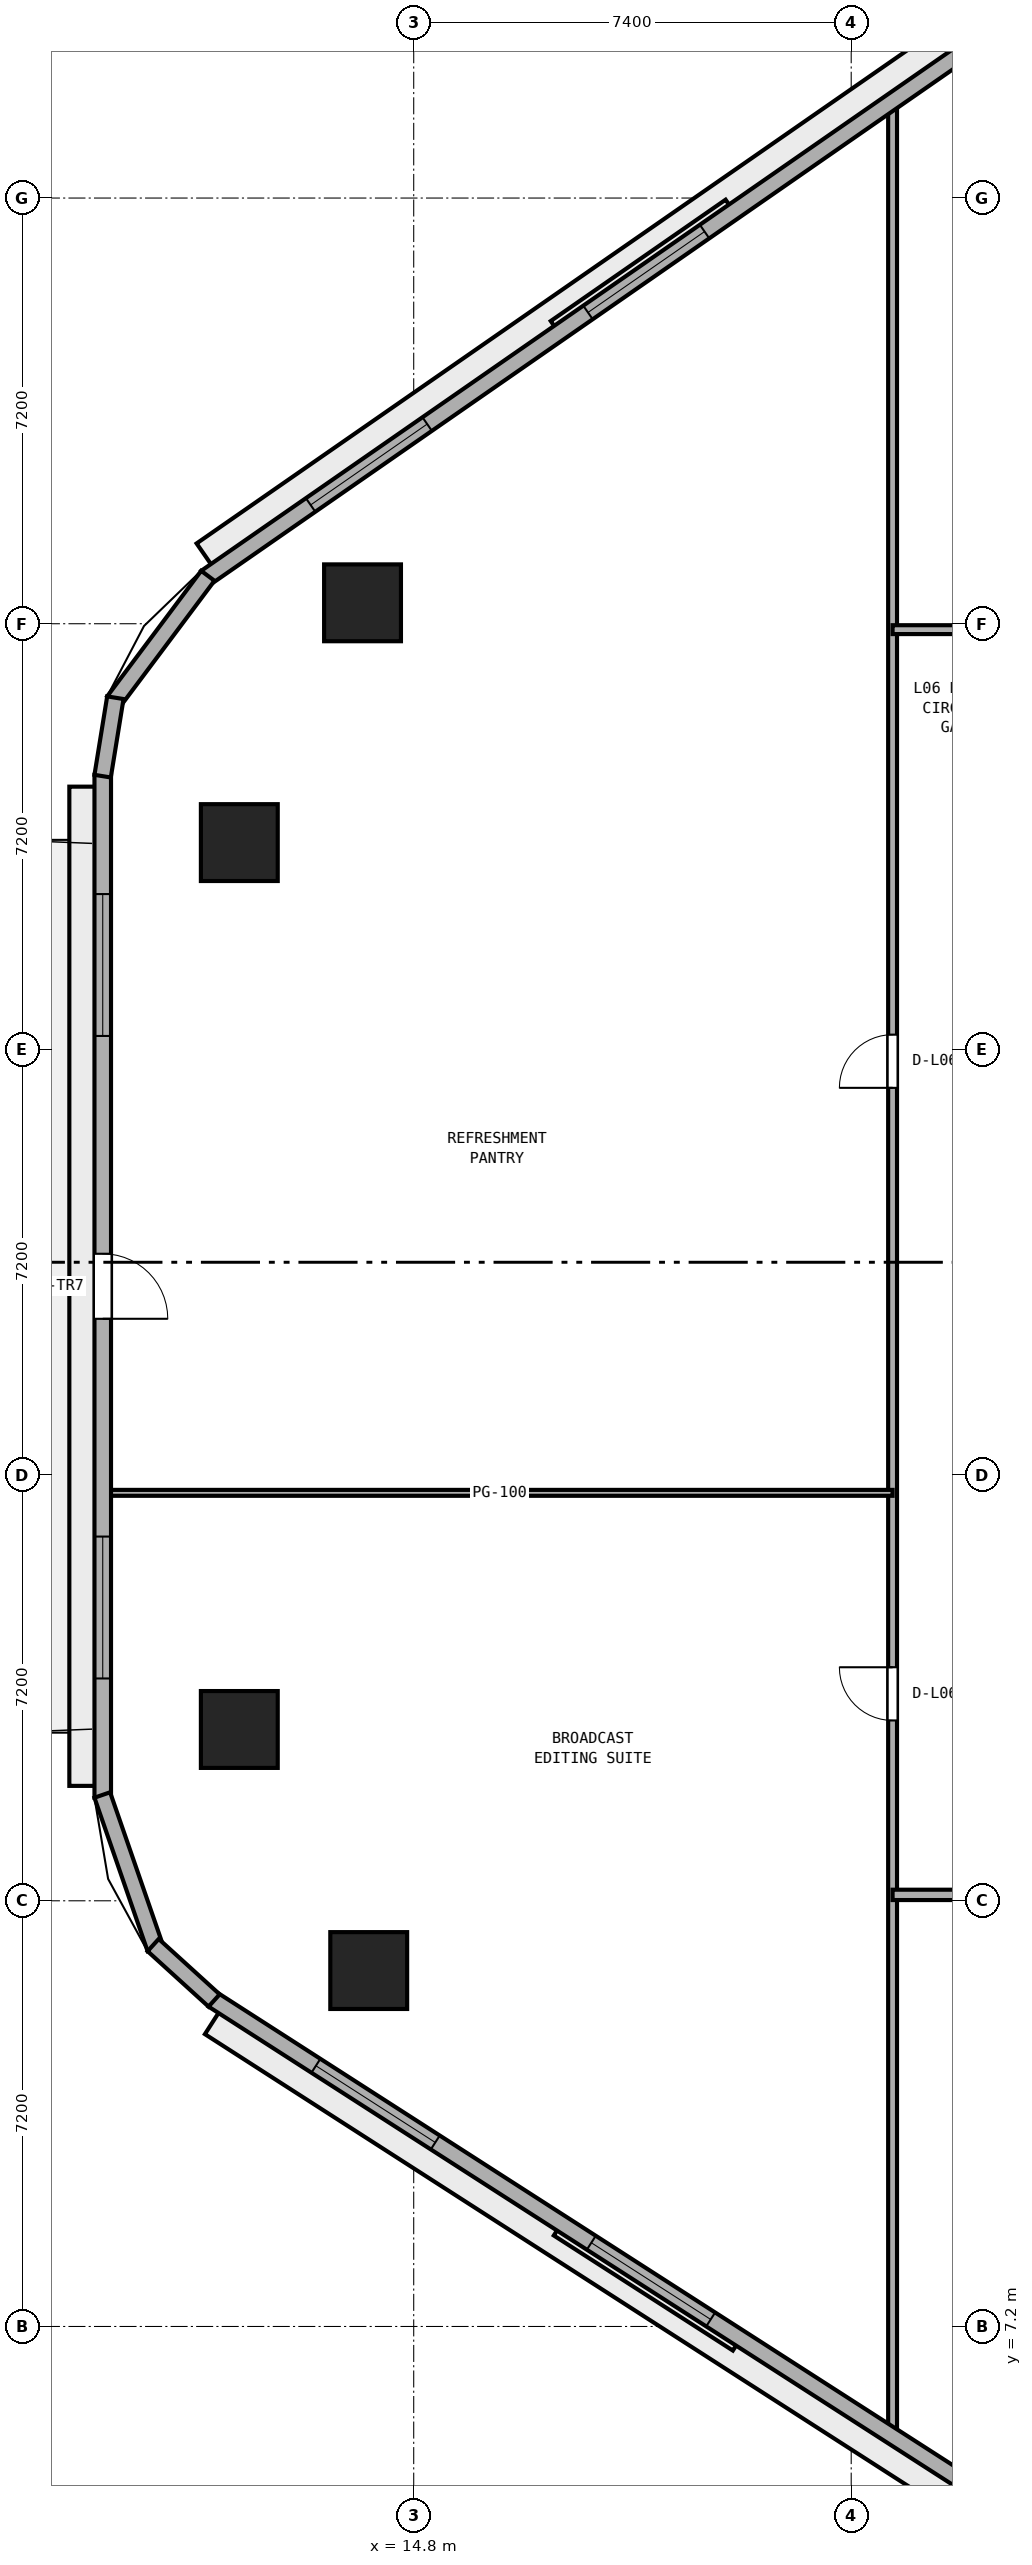
"""IFC4 building model, lengths in metres.
Left out: names, types, materials, properties, quantities, classifications, styles, units other than length and angle.
Written with IfcOpenShell. Run it as: python <this file> out.ifc"""

import sys

from ifc_helpers import new_model, si_unit, direction, frame, frame_2d, origin, origin_2d, place, context, subcontext, project, spatial, rectangle, extrude, element, fill, save


model = new_model("IFC4")
c1 = context("Model", 3, precision=1e-05, world=origin(), true_north=direction((0.0, 1.0)))
c2 = subcontext(c1, "Body", "Model", "MODEL_VIEW")
j1 = project(units=[si_unit("LENGTHUNIT", "METRE"), si_unit("PLANEANGLEUNIT", "RADIAN")], contexts=[c1])
p1 = place(None, origin())
s1 = spatial("IfcSite", under=j1, at=p1, CompositionType="ELEMENT")
p2 = place(p1, origin())
s2 = spatial("IfcBuilding", under=s1, at=p2, CompositionType="ELEMENT")
p3 = place(p2, frame((0.0, 0.0, 28.8)))
s3 = spatial("IfcBuildingStorey", under=s2, at=p3, CompositionType="ELEMENT", Elevation=28.8)
for number, where, z_axis, x_axis in (
    (1, (13.934, 36.354, 0.0), (0.0, 0.0, 1.0), (1.0, 0.0, 0.0)),
    (2, (11.85, 32.298, 0.0), (0.0, 0.0, 1.0), (1.0, 0.0, 0.0)),
    (3, (11.85, 17.298, 0.0), (0.0, 0.0, 1.0), (1.0, 0.0, 0.0)),
    (4, (14.039, 13.22, 0.0), (0.0, 0.0, 1.0), (1.0, 0.0, 0.0)),
):
    element("IfcColumn", number, at=place(p3, frame(where, z_axis=z_axis, x_axis=x_axis)), inside=s3, PredefinedType="COLUMN", context=c2, shape_type="SweptSolid", body=[
        extrude(rectangle(XDim=1.3, YDim=1.3, at=origin_2d()), origin(), (0.0, 0.0, 1.0), 3.8),
    ])
p4 = place(p3, frame((22.9, 5.316, 0.0), z_axis=(0.0, 0.0, 1.0), x_axis=(0.0, 1.0, 0.0)))
e5 = element("IfcWall", 5, at=p4, inside=s3, PredefinedType="PARTITIONING", context=c2, shape_type="SweptSolid", body=[
    extrude(rectangle(XDim=39.555, YDim=0.15, at=frame_2d((19.777, 0.0))), origin(), (0.0, 0.0, 1.0), 3.525),
])
p5 = place(p4, frame((12.135, 0.0, 0.0)))
e6 = element("IfcOpeningElement", 6, at=p5, cuts=e5, PredefinedType="OPENING", context=c2, shape_type="SweptSolid", body=[
    extrude(rectangle(XDim=0.9, YDim=2.1, at=frame_2d((0.45, 1.05))), frame((0.0, 0.085, 0.0), z_axis=(0.0, -1.0, 0.0), x_axis=(1.0, 0.0, 0.0)), (0.0, 0.0, 1.0), 0.17),
])
p6 = place(p4, frame((22.834, 0.0, 0.0)))
e7 = element("IfcOpeningElement", 7, at=p6, cuts=e5, PredefinedType="OPENING", context=c2, shape_type="SweptSolid", body=[
    extrude(rectangle(XDim=0.9, YDim=2.1, at=frame_2d((0.45, 1.05))), frame((0.0, 0.085, 0.0), z_axis=(0.0, -1.0, 0.0), x_axis=(1.0, 0.0, 0.0)), (0.0, 0.0, 1.0), 0.17),
])
p7 = place(p3, frame((22.9, 14.5, 0.0), z_axis=(0.0, 0.0, 1.0), x_axis=(1.0, 0.0, 0.0)))
e8 = element("IfcWall", 8, at=p7, inside=s3, PredefinedType="PARTITIONING", context=c2, shape_type="SweptSolid", body=[
    extrude(rectangle(XDim=28.2, YDim=0.175, at=frame_2d((14.1, 0.0))), origin(), (0.0, 0.0, 1.0), 3.525),
])
p8 = place(p7, frame((10.07, 0.0, 0.0)))
e9 = element("IfcOpeningElement", 9, at=p8, cuts=e8, PredefinedType="OPENING", context=c2, shape_type="SweptSolid", body=[
    extrude(rectangle(XDim=0.9, YDim=2.1, at=frame_2d((0.45, 1.05))), frame((0.0, 0.097, 0.0), z_axis=(0.0, -1.0, 0.0), x_axis=(1.0, 0.0, 0.0)), (0.0, 0.0, 1.0), 0.195),
])
p9 = place(p7, frame((23.93, 0.0, 0.0)))
e10 = element("IfcOpeningElement", 10, at=p9, cuts=e8, PredefinedType="OPENING", context=c2, shape_type="SweptSolid", body=[
    extrude(rectangle(XDim=0.9, YDim=2.1, at=frame_2d((0.45, 1.05))), frame((0.0, 0.097, 0.0), z_axis=(0.0, -1.0, 0.0), x_axis=(1.0, 0.0, 0.0)), (0.0, 0.0, 1.0), 0.195),
])
p10 = place(p3, frame((9.605, 21.3, 0.0), z_axis=(0.0, 0.0, 1.0), x_axis=(1.0, 0.0, 0.0)))
e11 = element("IfcWall", 11, at=p10, inside=s3, PredefinedType="PARTITIONING", context=c2, shape_type="SweptSolid", body=[
    extrude(rectangle(XDim=13.295, YDim=0.1, at=frame_2d((6.647, 0.0))), origin(), (0.0, 0.0, 1.0), 3.525),
])
p11 = place(p3, frame((22.9, 35.9, 0.0), z_axis=(0.0, 0.0, 1.0), x_axis=(1.0, 0.0, 0.0)))
e12 = element("IfcWall", 12, at=p11, inside=s3, PredefinedType="PARTITIONING", context=c2, shape_type="SweptSolid", body=[
    extrude(rectangle(XDim=28.2, YDim=0.15, at=frame_2d((14.1, 0.0))), origin(), (0.0, 0.0, 1.0), 3.525),
])
p12 = place(p11, frame((13.6, 0.0, 0.0)))
e13 = element("IfcOpeningElement", 13, at=p12, cuts=e12, PredefinedType="OPENING", context=c2, shape_type="SweptSolid", body=[
    extrude(rectangle(XDim=1.0, YDim=2.12, at=frame_2d((0.5, 1.06))), frame((0.0, 0.085, 0.0), z_axis=(0.0, -1.0, 0.0), x_axis=(1.0, 0.0, 0.0)), (0.0, 0.0, 1.0), 0.17),
])
p13 = place(p3, frame((26.182, 47.118, 0.0), z_axis=(0.0, 0.0, 1.0), x_axis=(-0.821547956627, -0.570139417127, 0.0)))
e14 = element("IfcWall", 14, at=p13, inside=s3, PredefinedType="STANDARD", context=c2, shape_type="SweptSolid", body=[
    extrude(rectangle(XDim=18.132, YDim=0.28, at=frame_2d((9.066, 0.0))), origin(), (0.0, 0.0, 1.0), 3.525),
])
p14 = place(p13, frame((7.866, 0.0, 0.9)))
e15 = element("IfcOpeningElement", 15, at=p14, cuts=e14, PredefinedType="OPENING", context=c2, shape_type="SweptSolid", body=[
    extrude(rectangle(XDim=2.4, YDim=1.75, at=frame_2d((1.2, 0.875))), frame((0.0, 0.15, 0.0), z_axis=(0.0, -1.0, 0.0), x_axis=(1.0, 0.0, 0.0)), (0.0, 0.0, 1.0), 0.3),
])
p15 = place(p13, frame((13.577, 0.0, 0.9)))
e16 = element("IfcOpeningElement", 16, at=p15, cuts=e14, PredefinedType="OPENING", context=c2, shape_type="SweptSolid", body=[
    extrude(rectangle(XDim=2.4, YDim=1.75, at=frame_2d((1.2, 0.875))), frame((0.0, 0.15, 0.0), z_axis=(0.0, -1.0, 0.0), x_axis=(1.0, 0.0, 0.0)), (0.0, 0.0, 1.0), 0.3),
])
p16 = place(p3, frame((9.54, 33.444, 0.0), z_axis=(0.0, 0.0, 1.0), x_axis=(0.0, -1.0, 0.0)))
e17 = element("IfcWall", 17, at=p16, inside=s3, PredefinedType="STANDARD", context=c2, shape_type="SweptSolid", body=[
    extrude(rectangle(XDim=17.301, YDim=0.28, at=frame_2d((8.65, 0.0))), origin(), (0.0, 0.0, 1.0), 3.525),
])
p17 = place(p16, frame((8.1, 0.0, 0.0)))
e18 = element("IfcOpeningElement", 18, at=p17, cuts=e17, PredefinedType="OPENING", context=c2, shape_type="SweptSolid", body=[
    extrude(rectangle(XDim=1.1, YDim=2.2, at=frame_2d((0.55, 1.1))), frame((0.0, 0.15, 0.0), z_axis=(0.0, -1.0, 0.0), x_axis=(1.0, 0.0, 0.0)), (0.0, 0.0, 1.0), 0.3),
])
p18 = place(p16, frame((2.017, 0.0, 0.9)))
e19 = element("IfcOpeningElement", 19, at=p18, cuts=e17, PredefinedType="OPENING", context=c2, shape_type="SweptSolid", body=[
    extrude(rectangle(XDim=2.4, YDim=1.75, at=frame_2d((1.2, 0.875))), frame((0.0, 0.15, 0.0), z_axis=(0.0, -1.0, 0.0), x_axis=(1.0, 0.0, 0.0)), (0.0, 0.0, 1.0), 0.3),
])
p19 = place(p16, frame((12.884, 0.0, 0.9)))
e20 = element("IfcOpeningElement", 20, at=p19, cuts=e17, PredefinedType="OPENING", context=c2, shape_type="SweptSolid", body=[
    extrude(rectangle(XDim=2.4, YDim=1.75, at=frame_2d((1.2, 0.875))), frame((0.0, 0.15, 0.0), z_axis=(0.0, -1.0, 0.0), x_axis=(1.0, 0.0, 0.0)), (0.0, 0.0, 1.0), 0.3),
])
p20 = place(p3, frame((11.405, 12.728, 0.0), z_axis=(0.0, 0.0, 1.0), x_axis=(0.841304564637, -0.540561402175, 0.0)))
e21 = element("IfcWall", 21, at=p20, inside=s3, PredefinedType="STANDARD", context=c2, shape_type="SweptSolid", body=[
    extrude(rectangle(XDim=17.612, YDim=0.28, at=frame_2d((8.806, 0.0))), origin(), (0.0, 0.0, 1.0), 3.525),
])
p21 = place(p20, frame((2.069, 0.0, 0.9)))
e22 = element("IfcOpeningElement", 22, at=p21, cuts=e21, PredefinedType="OPENING", context=c2, shape_type="SweptSolid", body=[
    extrude(rectangle(XDim=2.4, YDim=1.75, at=frame_2d((1.2, 0.875))), frame((0.0, 0.15, 0.0), z_axis=(0.0, -1.0, 0.0), x_axis=(1.0, 0.0, 0.0)), (0.0, 0.0, 1.0), 0.3),
])
p22 = place(p20, frame((7.606, 0.0, 0.9)))
e23 = element("IfcOpeningElement", 23, at=p22, cuts=e21, PredefinedType="OPENING", context=c2, shape_type="SweptSolid", body=[
    extrude(rectangle(XDim=2.4, YDim=1.75, at=frame_2d((1.2, 0.875))), frame((0.0, 0.15, 0.0), z_axis=(0.0, -1.0, 0.0), x_axis=(1.0, 0.0, 0.0)), (0.0, 0.0, 1.0), 0.3),
])
p23 = place(p3, frame((11.318, 36.811, 0.0), z_axis=(0.0, 0.0, 1.0), x_axis=(-0.599455152629, -0.800408345775, 0.0)))
e24 = element("IfcWall", 24, at=p23, inside=s3, PredefinedType="STANDARD", context=c2, shape_type="SweptSolid", body=[
    extrude(rectangle(XDim=2.653, YDim=0.28, at=frame_2d((1.327, 0.0))), origin(), (0.0, 0.0, 1.0), 3.525),
])
p24 = place(p3, frame((9.753, 34.749, 0.0), z_axis=(0.0, 0.0, 1.0), x_axis=(-0.160037671962, -0.987110907423, 0.0)))
e25 = element("IfcWall", 25, at=p24, inside=s3, PredefinedType="STANDARD", context=c2, shape_type="SweptSolid", body=[
    extrude(rectangle(XDim=1.344, YDim=0.28, at=frame_2d((0.672, 0.0))), origin(), (0.0, 0.0, 1.0), 3.525),
])
p25 = place(p3, frame((9.532, 16.189, 0.0), z_axis=(0.0, 0.0, 1.0), x_axis=(0.32708309668, -0.944995580871, 0.0)))
e26 = element("IfcWall", 26, at=p25, inside=s3, PredefinedType="STANDARD", context=c2, shape_type="SweptSolid", body=[
    extrude(rectangle(XDim=2.748, YDim=0.28, at=frame_2d((1.374, 0.0))), origin(), (0.0, 0.0, 1.0), 3.525),
])
p26 = place(p3, frame((10.393, 13.651, 0.0), z_axis=(0.0, 0.0, 1.0), x_axis=(0.74003521851, -0.672568119498, 0.0)))
e27 = element("IfcWall", 27, at=p26, inside=s3, PredefinedType="STANDARD", context=c2, shape_type="SweptSolid", body=[
    extrude(rectangle(XDim=1.393, YDim=0.28, at=frame_2d((0.697, 0.0))), origin(), (0.0, 0.0, 1.0), 3.525),
])
p27 = place(p5, origin())
e28 = element("IfcDoor", 28, at=p27, inside=s3, OperationType="SINGLE_SWING_RIGHT", PredefinedType="DOOR", context=c2, shape_type="SweptSolid", body=[
    extrude(rectangle(XDim=0.9, YDim=2.1, at=frame_2d((0.45, 1.05))), frame((0.0, 0.025, 0.0), z_axis=(0.0, -1.0, 0.0), x_axis=(1.0, 0.0, 0.0)), (0.0, 0.0, 1.0), 0.05),
])
fill(e6, e28)
p28 = place(p6, origin())
e29 = element("IfcDoor", 29, at=p28, inside=s3, OperationType="SINGLE_SWING_LEFT", PredefinedType="DOOR", context=c2, shape_type="SweptSolid", body=[
    extrude(rectangle(XDim=0.9, YDim=2.1, at=frame_2d((0.45, 1.05))), frame((0.0, 0.025, 0.0), z_axis=(0.0, -1.0, 0.0), x_axis=(1.0, 0.0, 0.0)), (0.0, 0.0, 1.0), 0.05),
])
fill(e7, e29)
p29 = place(p14, origin())
e30 = element("IfcWindow", 30, at=p29, inside=s3, PartitioningType="SINGLE_PANEL", PredefinedType="WINDOW", context=c2, shape_type="SweptSolid", body=[
    extrude(rectangle(XDim=2.4, YDim=1.75, at=frame_2d((1.2, 0.875))), frame((0.0, 0.03, 0.0), z_axis=(0.0, -1.0, 0.0), x_axis=(1.0, 0.0, 0.0)), (0.0, 0.0, 1.0), 0.06),
])
fill(e15, e30)
p30 = place(p15, origin())
e31 = element("IfcWindow", 31, at=p30, inside=s3, PartitioningType="SINGLE_PANEL", PredefinedType="WINDOW", context=c2, shape_type="SweptSolid", body=[
    extrude(rectangle(XDim=2.4, YDim=1.75, at=frame_2d((1.2, 0.875))), frame((0.0, 0.03, 0.0), z_axis=(0.0, -1.0, 0.0), x_axis=(1.0, 0.0, 0.0)), (0.0, 0.0, 1.0), 0.06),
])
fill(e16, e31)
p31 = place(p17, origin())
e32 = element("IfcDoor", 32, at=p31, inside=s3, OperationType="SINGLE_SWING_RIGHT", PredefinedType="DOOR", context=c2, shape_type="SweptSolid", body=[
    extrude(rectangle(XDim=1.1, YDim=2.2, at=frame_2d((0.55, 1.1))), frame((0.0, 0.025, 0.0), z_axis=(0.0, -1.0, 0.0), x_axis=(1.0, 0.0, 0.0)), (0.0, 0.0, 1.0), 0.05),
])
fill(e18, e32)
p32 = place(p18, origin())
e33 = element("IfcWindow", 33, at=p32, inside=s3, PartitioningType="SINGLE_PANEL", PredefinedType="WINDOW", context=c2, shape_type="SweptSolid", body=[
    extrude(rectangle(XDim=2.4, YDim=1.75, at=frame_2d((1.2, 0.875))), frame((0.0, 0.03, 0.0), z_axis=(0.0, -1.0, 0.0), x_axis=(1.0, 0.0, 0.0)), (0.0, 0.0, 1.0), 0.06),
])
fill(e19, e33)
p33 = place(p19, origin())
e34 = element("IfcWindow", 34, at=p33, inside=s3, PartitioningType="SINGLE_PANEL", PredefinedType="WINDOW", context=c2, shape_type="SweptSolid", body=[
    extrude(rectangle(XDim=2.4, YDim=1.75, at=frame_2d((1.2, 0.875))), frame((0.0, 0.03, 0.0), z_axis=(0.0, -1.0, 0.0), x_axis=(1.0, 0.0, 0.0)), (0.0, 0.0, 1.0), 0.06),
])
fill(e20, e34)
p34 = place(p21, origin())
e35 = element("IfcWindow", 35, at=p34, inside=s3, PartitioningType="SINGLE_PANEL", PredefinedType="WINDOW", context=c2, shape_type="SweptSolid", body=[
    extrude(rectangle(XDim=2.4, YDim=1.75, at=frame_2d((1.2, 0.875))), frame((0.0, 0.03, 0.0), z_axis=(0.0, -1.0, 0.0), x_axis=(1.0, 0.0, 0.0)), (0.0, 0.0, 1.0), 0.06),
])
fill(e22, e35)
p35 = place(p22, origin())
e36 = element("IfcWindow", 36, at=p35, inside=s3, PartitioningType="SINGLE_PANEL", PredefinedType="WINDOW", context=c2, shape_type="SweptSolid", body=[
    extrude(rectangle(XDim=2.4, YDim=1.75, at=frame_2d((1.2, 0.875))), frame((0.0, 0.03, 0.0), z_axis=(0.0, -1.0, 0.0), x_axis=(1.0, 0.0, 0.0)), (0.0, 0.0, 1.0), 0.06),
])
fill(e23, e36)
save(model, sys.argv[1])
